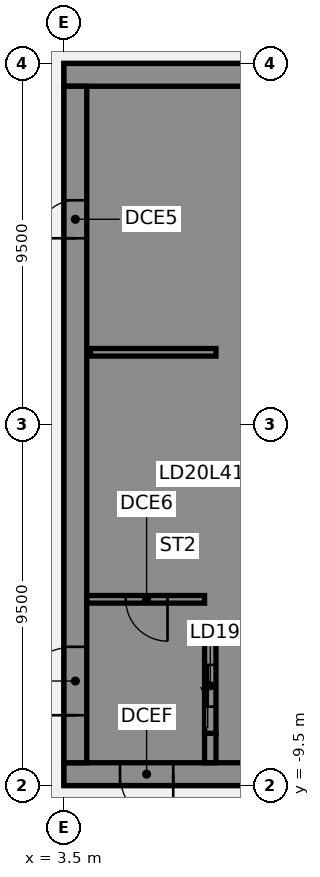
"""IFC4 building model, lengths in metres.
Left out: names, types, materials, properties, quantities, classifications, styles, units other than length and angle.
Written with IfcOpenShell. Run it as: python <this file> out.ifc"""

import sys

from ifc_helpers import new_model, si_unit, direction, frame, frame_2d, origin, place, context, subcontext, project, spatial, polyline, rectangle, outline, extrude, element, fill, save


model = new_model("IFC4")
c1 = context("Model", 3, precision=1e-05, world=origin(), true_north=direction((0.0, 1.0)))
c2 = subcontext(c1, "Body", "Model", "MODEL_VIEW")
j1 = project(units=[si_unit("LENGTHUNIT", "METRE"), si_unit("PLANEANGLEUNIT", "RADIAN")], contexts=[c1])
p1 = place(None, origin())
s1 = spatial("IfcSite", under=j1, at=p1, CompositionType="ELEMENT")
p2 = place(p1, origin())
s2 = spatial("IfcBuilding", under=s1, at=p2, CompositionType="ELEMENT")
p3 = place(p2, frame((0.0, 0.0, 166.75)))
s3 = spatial("IfcBuildingStorey", under=s2, at=p3, CompositionType="ELEMENT", Elevation=166.75)
p4 = place(p3, frame((16.5, -9.2, 0.0), z_axis=(0.0, 0.0, 1.0), x_axis=(-1.0, 0.0, 0.0)))
e1 = element("IfcWall", 1, at=p4, inside=s3, PredefinedType="SHEAR", context=c2, shape_type="SweptSolid", body=[
    extrude(rectangle(XDim=13.0, YDim=0.6, at=frame_2d((6.5, 0.0))), origin(), (0.0, 0.0, 1.0), 3.61),
])
p5 = place(p4, frame((4.15, 0.0, 0.0)))
e2 = element("IfcOpeningElement", 2, at=p5, cuts=e1, PredefinedType="OPENING", context=c2, shape_type="SweptSolid", body=[
    extrude(rectangle(XDim=1.4, YDim=2.1, at=frame_2d((0.7, 1.05))), frame((0.0, 0.31, 0.0), z_axis=(0.0, -1.0, 0.0), x_axis=(1.0, 0.0, 0.0)), (0.0, 0.0, 1.0), 0.62),
])
p6 = place(p4, frame((10.125, 0.0, 0.0)))
e3 = element("IfcOpeningElement", 3, at=p6, cuts=e1, PredefinedType="OPENING", context=c2, shape_type="SweptSolid", body=[
    extrude(rectangle(XDim=1.4, YDim=2.1, at=frame_2d((0.7, 1.05))), frame((0.0, 0.31, 0.0), z_axis=(0.0, -1.0, 0.0), x_axis=(1.0, 0.0, 0.0)), (0.0, 0.0, 1.0), 0.62),
])
p7 = place(p3, frame((16.5, 9.2, 0.0), z_axis=(0.0, 0.0, 1.0), x_axis=(-1.0, 0.0, 0.0)))
e4 = element("IfcWall", 4, at=p7, inside=s3, PredefinedType="SHEAR", context=c2, shape_type="SweptSolid", body=[
    extrude(rectangle(XDim=13.0, YDim=0.6, at=frame_2d((6.5, 0.0))), origin(), (0.0, 0.0, 1.0), 3.61),
])
p8 = place(p3, origin())
e5 = element("IfcWall", 5, at=p8, inside=s3, PredefinedType="SHEAR", context=c2, shape_type="SweptSolid", body=[
    extrude(outline(polyline([(9.8, -5.375), (7.5, -5.375), (7.5, -2.875), (9.8, -2.875), (9.8, -2.625), (7.5, -2.625), (7.5, -0.125), (9.8, -0.125), (9.8, 0.125), (7.5, 0.125), (7.5, 2.625), (9.8, 2.625), (9.8, 2.875), (7.5, 2.875), (7.5, 5.375), (9.8, 5.375), (9.8, 5.625), (7.5, 5.625), (7.5, 8.125), (9.8, 8.125), (9.8, 8.9), (7.5, 8.9), (7.2, 8.9), (7.2, -5.625), (7.5, -5.625), (9.8, -5.625), (9.8, -5.375)])), origin(), (0.0, 0.0, 1.0), 3.61),
])
p9 = place(p3, origin())
e6 = element("IfcWall", 6, at=p9, inside=s3, PredefinedType="SHEAR", context=c2, shape_type="SweptSolid", body=[
    extrude(outline(polyline([(7.5, -8.125), (7.5, -8.9), (9.8, -8.9), (9.8, -8.125), (9.8, -5.625), (9.55, -5.625), (9.55, -8.125), (7.5, -8.125)])), origin(), (0.0, 0.0, 1.0), 3.61),
])
p10 = place(p3, frame((7.35, -8.9, 0.0), z_axis=(0.0, 0.0, 1.0), x_axis=(0.0, 1.0, 0.0)))
e7 = element("IfcWall", 7, at=p10, inside=s3, PredefinedType="SHEAR", context=c2, shape_type="SweptSolid", body=[
    extrude(rectangle(XDim=0.775, YDim=0.3, at=frame_2d((0.387, 0.0))), origin(), (0.0, 0.0, 1.0), 3.61),
])
p11 = place(p3, frame((7.5, 1.9, 0.0), z_axis=(0.0, 0.0, 1.0), x_axis=(-1.0, 0.0, 0.0)))
e8 = element("IfcWall", 8, at=p11, inside=s3, PredefinedType="SHEAR", context=c2, shape_type="SweptSolid", body=[
    extrude(rectangle(XDim=3.3, YDim=0.2, at=frame_2d((1.65, 0.0))), origin(), (0.0, 0.0, 1.0), 3.61),
])
p12 = place(p3, frame((7.35, -8.125, 0.0), z_axis=(0.0, 0.0, 1.0), x_axis=(0.0, 1.0, 0.0)))
e9 = element("IfcWall", 9, at=p12, inside=s3, PredefinedType="SHEAR", context=c2, shape_type="SweptSolid", body=[
    extrude(rectangle(XDim=2.5, YDim=0.3, at=frame_2d((1.25, 0.0))), origin(), (0.0, 0.0, 1.0), 3.61),
])
p13 = place(p12, frame((0.7, 0.0, 0.0)))
e10 = element("IfcOpeningElement", 10, at=p13, cuts=e9, PredefinedType="OPENING", context=c2, shape_type="SweptSolid", body=[
    extrude(rectangle(XDim=1.1, YDim=2.1, at=frame_2d((0.55, 1.05))), frame((0.0, 0.16, 0.0), z_axis=(0.0, -1.0, 0.0), x_axis=(1.0, 0.0, 0.0)), (0.0, 0.0, 1.0), 0.32),
])
p14 = place(p3, frame((3.8, -8.9, 0.0), z_axis=(0.0, 0.0, 1.0), x_axis=(0.0, 1.0, 0.0)))
e11 = element("IfcWall", 11, at=p14, inside=s3, PredefinedType="SHEAR", context=c2, shape_type="SweptSolid", body=[
    extrude(rectangle(XDim=17.8, YDim=0.6, at=frame_2d((8.9, 0.0))), origin(), (0.0, 0.0, 1.0), 3.61),
])
p15 = place(p14, frame((1.25, 0.0, 0.0)))
e12 = element("IfcOpeningElement", 12, at=p15, cuts=e11, PredefinedType="OPENING", context=c2, shape_type="SweptSolid", body=[
    extrude(rectangle(XDim=1.8, YDim=2.1, at=frame_2d((0.9, 1.05))), frame((0.0, 0.31, 0.0), z_axis=(0.0, -1.0, 0.0), x_axis=(1.0, 0.0, 0.0)), (0.0, 0.0, 1.0), 0.62),
])
p16 = place(p14, frame((13.8, 0.0, 0.0)))
e13 = element("IfcOpeningElement", 13, at=p16, cuts=e11, PredefinedType="OPENING", context=c2, shape_type="SweptSolid", body=[
    extrude(rectangle(XDim=1.0, YDim=2.1, at=frame_2d((0.5, 1.05))), frame((0.0, 0.31, 0.0), z_axis=(0.0, -1.0, 0.0), x_axis=(1.0, 0.0, 0.0)), (0.0, 0.0, 1.0), 0.62),
])
p17 = place(p3, frame((7.2, -4.6, 0.0), z_axis=(0.0, 0.0, 1.0), x_axis=(-1.0, 0.0, 0.0)))
e14 = element("IfcWall", 14, at=p17, inside=s3, PredefinedType="SHEAR", context=c2, shape_type="SweptSolid", body=[
    extrude(rectangle(XDim=3.1, YDim=0.2, at=frame_2d((1.55, 0.0))), origin(), (0.0, 0.0, 1.0), 3.61),
])
p18 = place(p17, frame((0.975, 0.0, 0.0)))
e15 = element("IfcOpeningElement", 15, at=p18, cuts=e14, PredefinedType="OPENING", context=c2, shape_type="SweptSolid", body=[
    extrude(rectangle(XDim=1.1, YDim=2.1, at=frame_2d((0.55, 1.05))), frame((0.0, 0.11, 0.0), z_axis=(0.0, -1.0, 0.0), x_axis=(1.0, 0.0, 0.0)), (0.0, 0.0, 1.0), 0.22),
])
p19 = place(p6, origin())
e16 = element("IfcDoor", 16, at=p19, inside=s3, OperationType="SINGLE_SWING_LEFT", PredefinedType="DOOR", context=c2, shape_type="SweptSolid", body=[
    extrude(rectangle(XDim=1.4, YDim=2.1, at=frame_2d((0.7, 1.05))), frame((0.0, 0.025, 0.0), z_axis=(0.0, -1.0, 0.0), x_axis=(1.0, 0.0, 0.0)), (0.0, 0.0, 1.0), 0.05),
])
fill(e3, e16)
p20 = place(p15, origin())
e17 = element("IfcDoor", 17, at=p20, inside=s3, OperationType="SINGLE_SWING_LEFT", PredefinedType="DOOR", context=c2, shape_type="SweptSolid", body=[
    extrude(rectangle(XDim=1.8, YDim=2.1, at=frame_2d((0.9, 1.05))), frame((0.0, 0.025, 0.0), z_axis=(0.0, -1.0, 0.0), x_axis=(1.0, 0.0, 0.0)), (0.0, 0.0, 1.0), 0.05),
])
fill(e12, e17)
p21 = place(p16, origin())
e18 = element("IfcDoor", 18, at=p21, inside=s3, OperationType="SINGLE_SWING_LEFT", PredefinedType="DOOR", context=c2, shape_type="SweptSolid", body=[
    extrude(rectangle(XDim=1.0, YDim=2.1, at=frame_2d((0.5, 1.05))), frame((0.0, 0.025, 0.0), z_axis=(0.0, -1.0, 0.0), x_axis=(1.0, 0.0, 0.0)), (0.0, 0.0, 1.0), 0.05),
])
fill(e13, e18)
p22 = place(p18, origin())
e19 = element("IfcDoor", 19, at=p22, inside=s3, OperationType="SINGLE_SWING_LEFT", PredefinedType="DOOR", context=c2, shape_type="SweptSolid", body=[
    extrude(rectangle(XDim=1.1, YDim=2.1, at=frame_2d((0.55, 1.05))), frame((0.0, 0.025, 0.0), z_axis=(0.0, -1.0, 0.0), x_axis=(1.0, 0.0, 0.0)), (0.0, 0.0, 1.0), 0.05),
])
fill(e15, e19)
p23 = place(p13, origin())
e20 = element("IfcDoor", 20, at=p23, inside=s3, OperationType="SLIDING_TO_LEFT", PredefinedType="DOOR", context=c2, shape_type="SweptSolid", body=[
    extrude(rectangle(XDim=1.1, YDim=2.1, at=frame_2d((0.55, 1.05))), frame((0.0, 0.025, 0.0), z_axis=(0.0, -1.0, 0.0), x_axis=(1.0, 0.0, 0.0)), (0.0, 0.0, 1.0), 0.05),
])
fill(e10, e20)
save(model, sys.argv[1])
